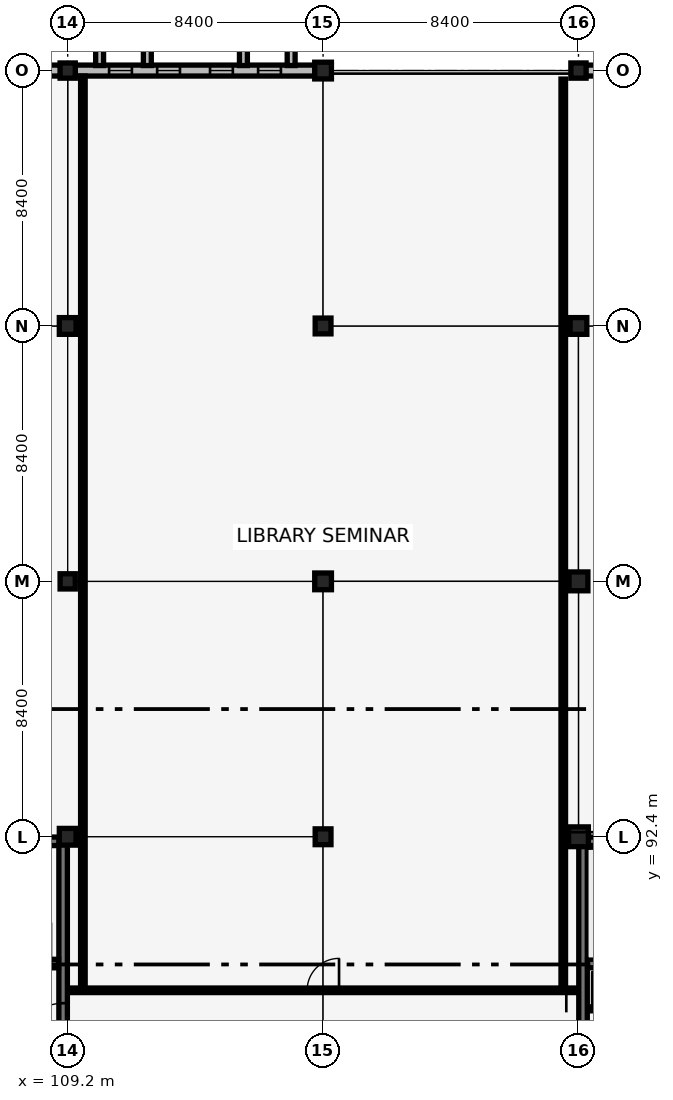
"""IFC4 building model, lengths in metres.
Left out: names, types, materials, properties, quantities, classifications, styles, units other than length and angle.
Written with IfcOpenShell. Run it as: python <this file> out.ifc"""

import sys

from ifc_helpers import new_model, si_unit, direction, frame, frame_2d, origin, origin_2d, place, context, subcontext, project, spatial, rectangle, extrude, element, fill, save


model = new_model("IFC4")
c1 = context("Model", 3, precision=1e-05, world=origin(), true_north=direction((0.0, 1.0)))
c2 = subcontext(c1, "Body", "Model", "MODEL_VIEW")
j1 = project(units=[si_unit("LENGTHUNIT", "METRE"), si_unit("PLANEANGLEUNIT", "RADIAN")], contexts=[c1])
p1 = place(None, origin())
s1 = spatial("IfcSite", under=j1, at=p1, CompositionType="ELEMENT")
p2 = place(p1, origin())
s2 = spatial("IfcBuilding", under=s1, at=p2, CompositionType="ELEMENT")
p3 = place(p2, frame((0.0, 0.0, 13.94)))
s3 = spatial("IfcBuildingStorey", under=s2, at=p3, CompositionType="ELEMENT", Elevation=13.94)
for number, where, z_axis, x_axis in (
    (1, (126.15, 92.25, 0.0), (0.0, 0.0, 1.0), (1.0, 0.0, 0.0)),
    (2, (126.15, 84.15, 0.0), (0.0, 0.0, 1.0), (0.0, 1.0, 0.0)),
):
    element("IfcWall", number, at=place(p3, frame(where, z_axis=z_axis, x_axis=x_axis)), inside=s3, PredefinedType="SHEAR", context=c2, shape_type="SweptSolid", body=[
        extrude(rectangle(XDim=8.1, YDim=0.28, at=frame_2d((4.05, 0.0))), origin(), (0.0, 0.0, 1.0), 3.78),
    ])
p4 = place(p3, frame((126.3, 88.23, 0.0), z_axis=(0.0, 0.0, 1.0), x_axis=(1.0, 0.0, 0.0)))
e3 = element("IfcWall", 3, at=p4, inside=s3, PredefinedType="SHEAR", context=c2, shape_type="SweptSolid", body=[
    extrude(rectangle(XDim=7.8, YDim=0.28, at=frame_2d((3.9, 0.0))), origin(), (0.0, 0.0, 1.0), 3.78),
])
p5 = place(p4, frame((6.2, 0.0, 0.0)))
e4 = element("IfcOpeningElement", 4, at=p5, cuts=e3, PredefinedType="OPENING", context=c2, shape_type="SweptSolid", body=[
    extrude(rectangle(XDim=1.35, YDim=2.15, at=frame_2d((0.675, 1.075))), frame((0.0, 0.15, 0.0), z_axis=(0.0, -1.0, 0.0), x_axis=(1.0, 0.0, 0.0)), (0.0, 0.0, 1.0), 0.3),
])
p6 = place(p3, frame((100.95, 92.25, 0.0), z_axis=(0.0, 0.0, 1.0), x_axis=(1.0, 0.0, 0.0)))
e5 = element("IfcWall", 5, at=p6, inside=s3, PredefinedType="SHEAR", context=c2, shape_type="SweptSolid", body=[
    extrude(rectangle(XDim=8.1, YDim=0.28, at=frame_2d((4.05, 0.0))), origin(), (0.0, 0.0, 1.0), 3.78),
])
p7 = place(p3, frame((109.05, 84.15, 0.0), z_axis=(0.0, 0.0, 1.0), x_axis=(0.0, 1.0, 0.0)))
e6 = element("IfcWall", 6, at=p7, inside=s3, PredefinedType="SHEAR", context=c2, shape_type="SweptSolid", body=[
    extrude(rectangle(XDim=8.1, YDim=0.28, at=frame_2d((4.05, 0.0))), origin(), (0.0, 0.0, 1.0), 3.78),
])
p8 = place(p7, frame((1.325, 0.0, 0.0)))
e7 = element("IfcOpeningElement", 7, at=p8, cuts=e6, PredefinedType="OPENING", context=c2, shape_type="SweptSolid", body=[
    extrude(rectangle(XDim=1.45, YDim=2.15, at=frame_2d((0.725, 1.075))), frame((0.0, 0.15, 0.0), z_axis=(0.0, -1.0, 0.0), x_axis=(1.0, 0.0, 0.0)), (0.0, 0.0, 1.0), 0.3),
])
p9 = place(p3, frame((101.1, 88.23, 0.0), z_axis=(0.0, 0.0, 1.0), x_axis=(1.0, 0.0, 0.0)))
e8 = element("IfcWall", 8, at=p9, inside=s3, PredefinedType="SHEAR", context=c2, shape_type="SweptSolid", body=[
    extrude(rectangle(XDim=7.8, YDim=0.28, at=frame_2d((3.9, 0.0))), origin(), (0.0, 0.0, 1.0), 3.78),
])
p10 = place(p9, frame((6.2, 0.0, 0.0)))
e9 = element("IfcOpeningElement", 9, at=p10, cuts=e8, PredefinedType="OPENING", context=c2, shape_type="SweptSolid", body=[
    extrude(rectangle(XDim=1.35, YDim=2.15, at=frame_2d((0.675, 1.075))), frame((0.0, 0.15, 0.0), z_axis=(0.0, -1.0, 0.0), x_axis=(1.0, 0.0, 0.0)), (0.0, 0.0, 1.0), 0.3),
])
p11 = place(p3, frame((109.2, 92.4, 0.0), z_axis=(0.0, 0.0, 1.0), x_axis=(1.0, 0.0, 0.0)))
e10 = element("IfcColumn", 10, at=p11, inside=s3, PredefinedType="COLUMN", context=c2, shape_type="SweptSolid", body=[
    extrude(rectangle(XDim=0.55, YDim=0.55, at=origin_2d()), origin(), (0.0, 0.0, 1.0), 3.78),
])
p12 = place(p3, frame((109.2, 100.8, 0.0), z_axis=(0.0, 0.0, 1.0), x_axis=(1.0, 0.0, 0.0)))
e11 = element("IfcColumn", 11, at=p12, inside=s3, PredefinedType="COLUMN", context=c2, shape_type="SweptSolid", body=[
    extrude(rectangle(XDim=0.5, YDim=0.5, at=origin_2d()), origin(), (0.0, 0.0, 1.0), 3.78),
])
p13 = place(p3, frame((109.2, 109.2, 0.0), z_axis=(0.0, 0.0, 1.0), x_axis=(1.0, 0.0, 0.0)))
e12 = element("IfcColumn", 12, at=p13, inside=s3, PredefinedType="COLUMN", context=c2, shape_type="SweptSolid", body=[
    extrude(rectangle(XDim=0.55, YDim=0.55, at=origin_2d()), origin(), (0.0, 0.0, 1.0), 3.78),
])
p14 = place(p3, frame((109.2, 117.6, 0.0), z_axis=(0.0, 0.0, 1.0), x_axis=(1.0, 0.0, 0.0)))
e13 = element("IfcColumn", 13, at=p14, inside=s3, PredefinedType="COLUMN", context=c2, shape_type="SweptSolid", body=[
    extrude(rectangle(XDim=0.5, YDim=0.5, at=origin_2d()), origin(), (0.0, 0.0, 1.0), 3.78),
])
p15 = place(p3, frame((117.6, 92.4, 0.0), z_axis=(0.0, 0.0, 1.0), x_axis=(1.0, 0.0, 0.0)))
e14 = element("IfcColumn", 14, at=p15, inside=s3, PredefinedType="COLUMN", context=c2, shape_type="SweptSolid", body=[
    extrude(rectangle(XDim=0.52, YDim=0.52, at=origin_2d()), origin(), (0.0, 0.0, 1.0), 3.78),
])
p16 = place(p3, frame((117.6, 100.8, 0.0), z_axis=(0.0, 0.0, 1.0), x_axis=(1.0, 0.0, 0.0)))
e15 = element("IfcColumn", 15, at=p16, inside=s3, PredefinedType="COLUMN", context=c2, shape_type="SweptSolid", body=[
    extrude(rectangle(XDim=0.55, YDim=0.55, at=origin_2d()), origin(), (0.0, 0.0, 1.0), 3.78),
])
p17 = place(p3, frame((117.6, 109.2, 0.0), z_axis=(0.0, 0.0, 1.0), x_axis=(1.0, 0.0, 0.0)))
e16 = element("IfcColumn", 16, at=p17, inside=s3, PredefinedType="COLUMN", context=c2, shape_type="SweptSolid", body=[
    extrude(rectangle(XDim=0.52, YDim=0.52, at=origin_2d()), origin(), (0.0, 0.0, 1.0), 3.78),
])
p18 = place(p3, frame((117.6, 117.6, 0.0), z_axis=(0.0, 0.0, 1.0), x_axis=(1.0, 0.0, 0.0)))
e17 = element("IfcColumn", 17, at=p18, inside=s3, PredefinedType="COLUMN", context=c2, shape_type="SweptSolid", body=[
    extrude(rectangle(XDim=0.55, YDim=0.55, at=origin_2d()), origin(), (0.0, 0.0, 1.0), 3.78),
])
p19 = place(p3, frame((126.0, 92.4, 0.0), z_axis=(0.0, 0.0, 1.0), x_axis=(1.0, 0.0, 0.0)))
e18 = element("IfcColumn", 18, at=p19, inside=s3, PredefinedType="COLUMN", context=c2, shape_type="SweptSolid", body=[
    extrude(rectangle(XDim=0.65, YDim=0.65, at=origin_2d()), origin(), (0.0, 0.0, 1.0), 3.78),
])
p20 = place(p3, frame((126.0, 100.8, 0.0), z_axis=(0.0, 0.0, 1.0), x_axis=(1.0, 0.0, 0.0)))
e19 = element("IfcColumn", 19, at=p20, inside=s3, PredefinedType="COLUMN", context=c2, shape_type="SweptSolid", body=[
    extrude(rectangle(XDim=0.62, YDim=0.62, at=origin_2d()), origin(), (0.0, 0.0, 1.0), 3.78),
])
p21 = place(p3, frame((126.0, 109.2, 0.0), z_axis=(0.0, 0.0, 1.0), x_axis=(1.0, 0.0, 0.0)))
e20 = element("IfcColumn", 20, at=p21, inside=s3, PredefinedType="COLUMN", context=c2, shape_type="SweptSolid", body=[
    extrude(rectangle(XDim=0.55, YDim=0.55, at=origin_2d()), origin(), (0.0, 0.0, 1.0), 3.78),
])
p22 = place(p3, frame((126.0, 117.6, 0.0), z_axis=(0.0, 0.0, 1.0), x_axis=(1.0, 0.0, 0.0)))
e21 = element("IfcColumn", 21, at=p22, inside=s3, PredefinedType="COLUMN", context=c2, shape_type="SweptSolid", body=[
    extrude(rectangle(XDim=0.5, YDim=0.5, at=origin_2d()), origin(), (0.0, 0.0, 1.0), 3.78),
])
p23 = place(p3, frame((101.06, 117.6, 0.0), z_axis=(0.0, 0.0, 1.0), x_axis=(1.0, 0.0, 0.0)))
e22 = element("IfcWall", 22, at=p23, inside=s3, PredefinedType="SOLIDWALL", context=c2, shape_type="SweptSolid", body=[
    extrude(rectangle(XDim=7.905, YDim=0.36, at=frame_2d((3.953, 0.0))), origin(), (0.0, 0.0, 1.0), 3.15),
])
p24 = place(p23, frame((1.127, 0.0, 0.7)))
e23 = element("IfcOpeningElement", 23, at=p24, cuts=e22, PredefinedType="OPENING", context=c2, shape_type="SweptSolid", body=[
    extrude(rectangle(XDim=0.75, YDim=2.1, at=frame_2d((0.375, 1.05))), frame((0.0, 0.19, 0.0), z_axis=(0.0, -1.0, 0.0), x_axis=(1.0, 0.0, 0.0)), (0.0, 0.0, 1.0), 0.38),
])
p25 = place(p23, frame((2.708, 0.0, 0.7)))
e24 = element("IfcOpeningElement", 24, at=p25, cuts=e22, PredefinedType="OPENING", context=c2, shape_type="SweptSolid", body=[
    extrude(rectangle(XDim=0.75, YDim=2.1, at=frame_2d((0.375, 1.05))), frame((0.0, 0.19, 0.0), z_axis=(0.0, -1.0, 0.0), x_axis=(1.0, 0.0, 0.0)), (0.0, 0.0, 1.0), 0.38),
])
p26 = place(p23, frame((4.447, 0.0, 0.7)))
e25 = element("IfcOpeningElement", 25, at=p26, cuts=e22, PredefinedType="OPENING", context=c2, shape_type="SweptSolid", body=[
    extrude(rectangle(XDim=0.75, YDim=2.1, at=frame_2d((0.375, 1.05))), frame((0.0, 0.19, 0.0), z_axis=(0.0, -1.0, 0.0), x_axis=(1.0, 0.0, 0.0)), (0.0, 0.0, 1.0), 0.38),
])
p27 = place(p23, frame((6.028, 0.0, 0.7)))
e26 = element("IfcOpeningElement", 26, at=p27, cuts=e22, PredefinedType="OPENING", context=c2, shape_type="SweptSolid", body=[
    extrude(rectangle(XDim=0.75, YDim=2.1, at=frame_2d((0.375, 1.05))), frame((0.0, 0.19, 0.0), z_axis=(0.0, -1.0, 0.0), x_axis=(1.0, 0.0, 0.0)), (0.0, 0.0, 1.0), 0.38),
])
p28 = place(p3, frame((109.435, 117.6, 0.0), z_axis=(0.0, 0.0, 1.0), x_axis=(1.0, 0.0, 0.0)))
e27 = element("IfcWall", 27, at=p28, inside=s3, PredefinedType="SOLIDWALL", context=c2, shape_type="SweptSolid", body=[
    extrude(rectangle(XDim=7.905, YDim=0.36, at=frame_2d((3.953, 0.0))), origin(), (0.0, 0.0, 1.0), 3.15),
])
p29 = place(p28, frame((1.127, 0.0, 0.7)))
e28 = element("IfcOpeningElement", 28, at=p29, cuts=e27, PredefinedType="OPENING", context=c2, shape_type="SweptSolid", body=[
    extrude(rectangle(XDim=0.75, YDim=2.1, at=frame_2d((0.375, 1.05))), frame((0.0, 0.19, 0.0), z_axis=(0.0, -1.0, 0.0), x_axis=(1.0, 0.0, 0.0)), (0.0, 0.0, 1.0), 0.38),
])
p30 = place(p28, frame((2.708, 0.0, 0.7)))
e29 = element("IfcOpeningElement", 29, at=p30, cuts=e27, PredefinedType="OPENING", context=c2, shape_type="SweptSolid", body=[
    extrude(rectangle(XDim=0.75, YDim=2.1, at=frame_2d((0.375, 1.05))), frame((0.0, 0.19, 0.0), z_axis=(0.0, -1.0, 0.0), x_axis=(1.0, 0.0, 0.0)), (0.0, 0.0, 1.0), 0.38),
])
p31 = place(p28, frame((4.447, 0.0, 0.7)))
e30 = element("IfcOpeningElement", 30, at=p31, cuts=e27, PredefinedType="OPENING", context=c2, shape_type="SweptSolid", body=[
    extrude(rectangle(XDim=0.75, YDim=2.1, at=frame_2d((0.375, 1.05))), frame((0.0, 0.19, 0.0), z_axis=(0.0, -1.0, 0.0), x_axis=(1.0, 0.0, 0.0)), (0.0, 0.0, 1.0), 0.38),
])
p32 = place(p28, frame((6.028, 0.0, 0.7)))
e31 = element("IfcOpeningElement", 31, at=p32, cuts=e27, PredefinedType="OPENING", context=c2, shape_type="SweptSolid", body=[
    extrude(rectangle(XDim=0.75, YDim=2.1, at=frame_2d((0.375, 1.05))), frame((0.0, 0.19, 0.0), z_axis=(0.0, -1.0, 0.0), x_axis=(1.0, 0.0, 0.0)), (0.0, 0.0, 1.0), 0.38),
])
for number, where, z_axis, x_axis in (
    (32, (110.25, 117.765, 0.0), (0.0, 0.0, 1.0), (0.0, 1.0, 0.0)),
    (33, (111.82, 117.765, 0.0), (0.0, 0.0, 1.0), (0.0, 1.0, 0.0)),
    (34, (114.98, 117.765, 0.0), (0.0, 0.0, 1.0), (0.0, 1.0, 0.0)),
    (35, (116.55, 117.765, 0.0), (0.0, 0.0, 1.0), (0.0, 1.0, 0.0)),
):
    element("IfcWall", number, at=place(p3, frame(where, z_axis=z_axis, x_axis=x_axis)), inside=s3, PredefinedType="SOLIDWALL", context=c2, shape_type="SweptSolid", body=[
        extrude(rectangle(XDim=0.7, YDim=0.26, at=frame_2d((0.35, 0.0))), origin(), (0.0, 0.0, 1.0), 4.08),
    ])
p33 = place(p3, frame((126.235, 117.6, 0.0), z_axis=(0.0, 0.0, 1.0), x_axis=(1.0, 0.0, 0.0)))
e36 = element("IfcWall", 36, at=p33, inside=s3, PredefinedType="SOLIDWALL", context=c2, shape_type="SweptSolid", body=[
    extrude(rectangle(XDim=7.905, YDim=0.36, at=frame_2d((3.952, 0.0))), origin(), (0.0, 0.0, 1.0), 3.15),
])
p34 = place(p33, frame((1.127, 0.0, 0.7)))
e37 = element("IfcOpeningElement", 37, at=p34, cuts=e36, PredefinedType="OPENING", context=c2, shape_type="SweptSolid", body=[
    extrude(rectangle(XDim=0.75, YDim=2.1, at=frame_2d((0.375, 1.05))), frame((0.0, 0.19, 0.0), z_axis=(0.0, -1.0, 0.0), x_axis=(1.0, 0.0, 0.0)), (0.0, 0.0, 1.0), 0.38),
])
p35 = place(p33, frame((2.708, 0.0, 0.7)))
e38 = element("IfcOpeningElement", 38, at=p35, cuts=e36, PredefinedType="OPENING", context=c2, shape_type="SweptSolid", body=[
    extrude(rectangle(XDim=0.75, YDim=2.1, at=frame_2d((0.375, 1.05))), frame((0.0, 0.19, 0.0), z_axis=(0.0, -1.0, 0.0), x_axis=(1.0, 0.0, 0.0)), (0.0, 0.0, 1.0), 0.38),
])
p36 = place(p33, frame((4.447, 0.0, 0.7)))
e39 = element("IfcOpeningElement", 39, at=p36, cuts=e36, PredefinedType="OPENING", context=c2, shape_type="SweptSolid", body=[
    extrude(rectangle(XDim=0.75, YDim=2.1, at=frame_2d((0.375, 1.05))), frame((0.0, 0.19, 0.0), z_axis=(0.0, -1.0, 0.0), x_axis=(1.0, 0.0, 0.0)), (0.0, 0.0, 1.0), 0.38),
])
p37 = place(p33, frame((6.028, 0.0, 0.7)))
e40 = element("IfcOpeningElement", 40, at=p37, cuts=e36, PredefinedType="OPENING", context=c2, shape_type="SweptSolid", body=[
    extrude(rectangle(XDim=0.75, YDim=2.1, at=frame_2d((0.375, 1.05))), frame((0.0, 0.19, 0.0), z_axis=(0.0, -1.0, 0.0), x_axis=(1.0, 0.0, 0.0)), (0.0, 0.0, 1.0), 0.38),
])
p38 = place(p3, frame((126.32, 86.74, 0.0), z_axis=(0.0, 0.0, 1.0), x_axis=(1.0, 0.0, 0.0)))
e41 = element("IfcWall", 41, at=p38, inside=s3, PredefinedType="PARTITIONING", context=c2, shape_type="SweptSolid", body=[
    extrude(rectangle(XDim=1.62, YDim=0.13, at=frame_2d((0.81, 0.0))), origin(), (0.0, 0.0, 1.0), 3.78),
])
p39 = place(p3, frame((109.23, 87.35, 0.0), z_axis=(0.0, 0.0, 1.0), x_axis=(1.0, 0.0, 0.0)))
e42 = element("IfcWall", 42, at=p39, inside=s3, PredefinedType="PARTITIONING", context=c2, shape_type="SweptSolid", body=[
    extrude(rectangle(XDim=16.74, YDim=0.15, at=frame_2d((8.37, 0.0))), origin(), (0.0, 0.0, 1.0), 3.1),
])
p40 = place(p39, frame((7.845, 0.0, 0.0)))
e43 = element("IfcOpeningElement", 43, at=p40, cuts=e42, PredefinedType="OPENING", context=c2, shape_type="SweptSolid", body=[
    extrude(rectangle(XDim=1.05, YDim=2.15, at=frame_2d((0.525, 1.075))), frame((0.0, 0.085, 0.0), z_axis=(0.0, -1.0, 0.0), x_axis=(1.0, 0.0, 0.0)), (0.0, 0.0, 1.0), 0.17),
])
p41 = place(p3, frame((109.7, 87.5, 0.0), z_axis=(0.0, 0.0, 1.0), x_axis=(0.0, 1.0, 0.0)))
e44 = element("IfcWall", 44, at=p41, inside=s3, PredefinedType="PARTITIONING", context=c2, shape_type="SweptSolid", body=[
    extrude(rectangle(XDim=29.92, YDim=0.15, at=frame_2d((14.96, 0.0))), origin(), (0.0, 0.0, 1.0), 3.05),
])
p42 = place(p3, frame((125.5, 87.5, 0.0), z_axis=(0.0, 0.0, 1.0), x_axis=(0.0, 1.0, 0.0)))
e45 = element("IfcWall", 45, at=p42, inside=s3, PredefinedType="PARTITIONING", context=c2, shape_type="SweptSolid", body=[
    extrude(rectangle(XDim=29.82, YDim=0.15, at=frame_2d((14.91, 0.0))), origin(), (0.0, 0.0, 1.0), 3.05),
])
p43 = place(p29, origin())
e46 = element("IfcWindow", 46, at=p43, inside=s3, PartitioningType="DOUBLE_PANEL_VERTICAL", PredefinedType="WINDOW", context=c2, shape_type="SweptSolid", body=[
    extrude(rectangle(XDim=0.75, YDim=2.1, at=frame_2d((0.375, 1.05))), frame((0.0, 0.03, 0.0), z_axis=(0.0, -1.0, 0.0), x_axis=(1.0, 0.0, 0.0)), (0.0, 0.0, 1.0), 0.06),
])
fill(e28, e46)
p44 = place(p30, origin())
e47 = element("IfcWindow", 47, at=p44, inside=s3, PartitioningType="DOUBLE_PANEL_VERTICAL", PredefinedType="WINDOW", context=c2, shape_type="SweptSolid", body=[
    extrude(rectangle(XDim=0.75, YDim=2.1, at=frame_2d((0.375, 1.05))), frame((0.0, 0.03, 0.0), z_axis=(0.0, -1.0, 0.0), x_axis=(1.0, 0.0, 0.0)), (0.0, 0.0, 1.0), 0.06),
])
fill(e29, e47)
p45 = place(p31, origin())
e48 = element("IfcWindow", 48, at=p45, inside=s3, PartitioningType="DOUBLE_PANEL_VERTICAL", PredefinedType="WINDOW", context=c2, shape_type="SweptSolid", body=[
    extrude(rectangle(XDim=0.75, YDim=2.1, at=frame_2d((0.375, 1.05))), frame((0.0, 0.03, 0.0), z_axis=(0.0, -1.0, 0.0), x_axis=(1.0, 0.0, 0.0)), (0.0, 0.0, 1.0), 0.06),
])
fill(e30, e48)
p46 = place(p32, origin())
e49 = element("IfcWindow", 49, at=p46, inside=s3, PartitioningType="DOUBLE_PANEL_VERTICAL", PredefinedType="WINDOW", context=c2, shape_type="SweptSolid", body=[
    extrude(rectangle(XDim=0.75, YDim=2.1, at=frame_2d((0.375, 1.05))), frame((0.0, 0.03, 0.0), z_axis=(0.0, -1.0, 0.0), x_axis=(1.0, 0.0, 0.0)), (0.0, 0.0, 1.0), 0.06),
])
fill(e31, e49)
p47 = place(p8, origin())
e50 = element("IfcDoor", 50, at=p47, inside=s3, OperationType="DOUBLE_DOOR_SINGLE_SWING", PredefinedType="DOOR", context=c2, shape_type="SweptSolid", body=[
    extrude(rectangle(XDim=1.45, YDim=2.15, at=frame_2d((0.725, 1.075))), frame((0.0, 0.025, 0.0), z_axis=(0.0, -1.0, 0.0), x_axis=(1.0, 0.0, 0.0)), (0.0, 0.0, 1.0), 0.05),
])
fill(e7, e50)
p48 = place(p40, origin())
e51 = element("IfcDoor", 51, at=p48, inside=s3, OperationType="SINGLE_SWING_RIGHT", PredefinedType="DOOR", context=c2, shape_type="SweptSolid", body=[
    extrude(rectangle(XDim=1.05, YDim=2.15, at=frame_2d((0.525, 1.075))), frame((0.0, 0.025, 0.0), z_axis=(0.0, -1.0, 0.0), x_axis=(1.0, 0.0, 0.0)), (0.0, 0.0, 1.0), 0.05),
])
fill(e43, e51)
save(model, sys.argv[1])
